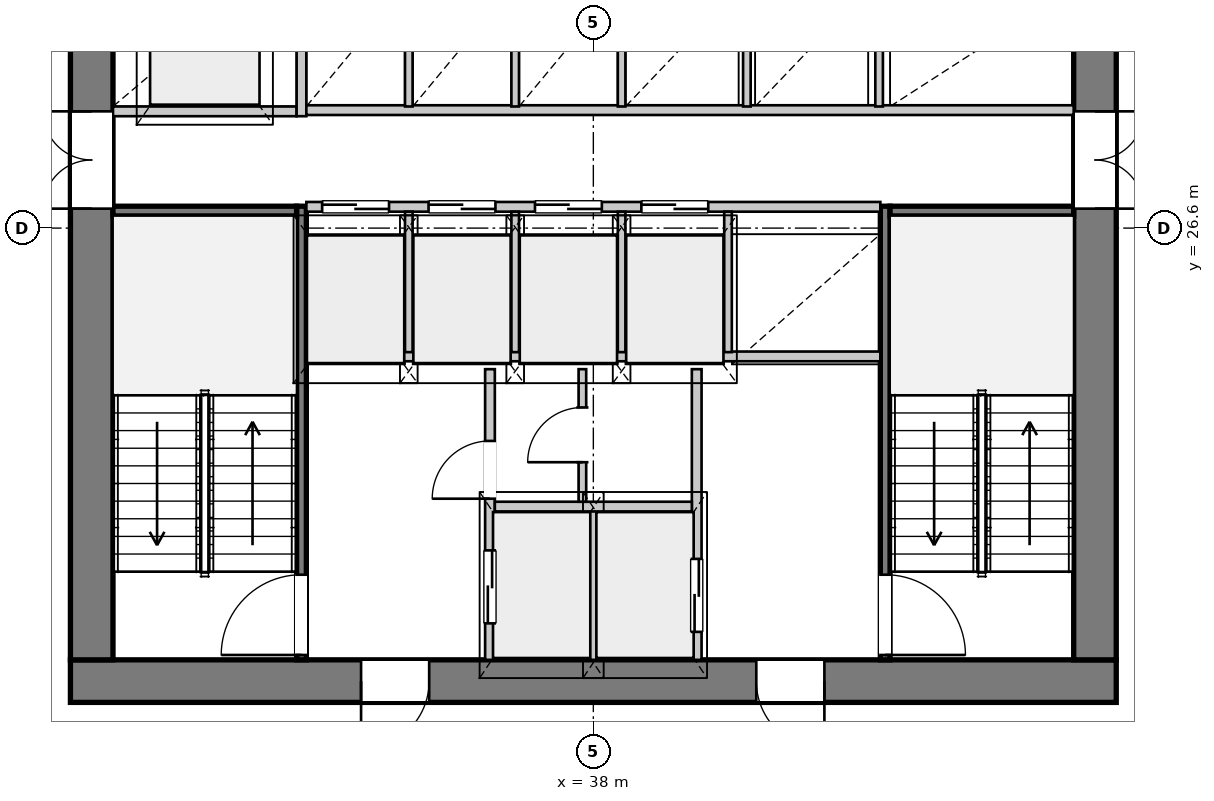
"""IFC4 building model, lengths in metres.
Left out: names, types, materials, properties, quantities, classifications, styles, units other than length and angle.
Written with IfcOpenShell. Run it as: python <this file> out.ifc"""

import sys

from ifc_helpers import new_model, si_unit, direction, frame, frame_2d, origin, place, context, subcontext, project, spatial, rectangle, extrude, source, transform, mapped, element, fill, save


model = new_model("IFC4")
c1 = context("Model", 3, precision=1e-05, world=origin(), true_north=direction((0.0, 1.0)))
c2 = subcontext(c1, "Body", "Model", "MODEL_VIEW")
j1 = project(units=[si_unit("LENGTHUNIT", "METRE"), si_unit("PLANEANGLEUNIT", "RADIAN")], contexts=[c1])
p1 = place(None, origin())
s1 = spatial("IfcSite", under=j1, at=p1, CompositionType="ELEMENT")
p2 = place(p1, origin())
s2 = spatial("IfcBuilding", under=s1, at=p2, CompositionType="ELEMENT")
p3 = place(p2, frame((0.0, 0.0, 98.6)))
s3 = spatial("IfcBuildingStorey", under=s2, at=p3, CompositionType="ELEMENT", Elevation=98.6)
p4 = place(p3, frame((46.6, 19.15, 0.0), z_axis=(0.0, 0.0, 1.0), x_axis=(-1.0, 0.0, 0.0)))
e1 = element("IfcWall", 1, at=p4, inside=s3, PredefinedType="SHEAR", context=c2, shape_type="SweptSolid", body=[
    extrude(rectangle(XDim=17.2, YDim=0.7, at=frame_2d((8.6, 0.0))), origin(), (0.0, 0.0, 1.0), 3.3),
])
p5 = place(p4, frame((4.8, 0.0, 0.0)))
e2 = element("IfcOpeningElement", 2, at=p5, cuts=e1, PredefinedType="OPENING", context=c2, shape_type="SweptSolid", body=[
    extrude(rectangle(XDim=1.12, YDim=2.25, at=frame_2d((0.56, 1.125))), frame((0.0, 0.36, 0.0), z_axis=(0.0, -1.0, 0.0), x_axis=(1.0, 0.0, 0.0)), (0.0, 0.0, 1.0), 0.72),
])
p6 = place(p4, frame((11.3, 0.0, 0.0)))
e3 = element("IfcOpeningElement", 3, at=p6, cuts=e1, PredefinedType="OPENING", context=c2, shape_type="SweptSolid", body=[
    extrude(rectangle(XDim=1.12, YDim=2.25, at=frame_2d((0.56, 1.125))), frame((0.0, 0.36, 0.0), z_axis=(0.0, -1.0, 0.0), x_axis=(1.0, 0.0, 0.0)), (0.0, 0.0, 1.0), 0.72),
])
p7 = place(p3, frame((29.75, 19.5, 0.0), z_axis=(0.0, 0.0, 1.0), x_axis=(0.0, 1.0, 0.0)))
e4 = element("IfcWall", 4, at=p7, inside=s3, PredefinedType="SHEAR", context=c2, shape_type="SweptSolid", body=[
    extrude(rectangle(XDim=14.2, YDim=0.7, at=frame_2d((7.1, 0.0))), origin(), (0.0, 0.0, 1.0), 3.3),
])
p8 = place(p7, frame((7.42, 0.0, 0.0)))
e5 = element("IfcOpeningElement", 5, at=p8, cuts=e4, PredefinedType="OPENING", context=c2, shape_type="SweptSolid", body=[
    extrude(rectangle(XDim=1.6, YDim=2.2, at=frame_2d((0.8, 1.1))), frame((0.0, 0.36, 0.0), z_axis=(0.0, -1.0, 0.0), x_axis=(1.0, 0.0, 0.0)), (0.0, 0.0, 1.0), 0.72),
])
p9 = place(p3, frame((46.25, 33.7, 0.0), z_axis=(0.0, 0.0, 1.0), x_axis=(0.0, -1.0, 0.0)))
e6 = element("IfcWall", 6, at=p9, inside=s3, PredefinedType="SHEAR", context=c2, shape_type="SweptSolid", body=[
    extrude(rectangle(XDim=14.2, YDim=0.7, at=frame_2d((7.1, 0.0))), origin(), (0.0, 0.0, 1.0), 3.3),
])
p10 = place(p9, frame((5.18, 0.0, 0.0)))
e7 = element("IfcOpeningElement", 7, at=p10, cuts=e6, PredefinedType="OPENING", context=c2, shape_type="SweptSolid", body=[
    extrude(rectangle(XDim=1.6, YDim=2.2, at=frame_2d((0.8, 1.1))), frame((0.0, 0.36, 0.0), z_axis=(0.0, -1.0, 0.0), x_axis=(1.0, 0.0, 0.0)), (0.0, 0.0, 1.0), 0.72),
])
p11 = place(p3, frame((33.2, 19.5, 0.0), z_axis=(0.0, 0.0, 1.0), x_axis=(0.0, 1.0, 0.0)))
e8 = element("IfcWall", 8, at=p11, inside=s3, PredefinedType="PARTITIONING", context=c2, shape_type="SweptSolid", body=[
    extrude(rectangle(XDim=7.46, YDim=0.16, at=frame_2d((3.73, 0.0))), origin(), (0.0, 0.0, 1.0), 3.3),
])
p12 = place(p11, frame((0.08, 0.0, 0.0)))
e9 = element("IfcOpeningElement", 9, at=p12, cuts=e8, PredefinedType="OPENING", context=c2, shape_type="SweptSolid", body=[
    extrude(rectangle(XDim=1.32, YDim=2.2, at=frame_2d((0.66, 1.1))), frame((0.0, 0.09, 0.0), z_axis=(0.0, -1.0, 0.0), x_axis=(1.0, 0.0, 0.0)), (0.0, 0.0, 1.0), 0.18),
])
p13 = place(p3, frame((30.1, 26.88, 0.0), z_axis=(0.0, 0.0, 1.0), x_axis=(1.0, 0.0, 0.0)))
e10 = element("IfcWall", 10, at=p13, inside=s3, PredefinedType="PARTITIONING", context=c2, shape_type="SweptSolid", body=[
    extrude(rectangle(XDim=3.02, YDim=0.16, at=frame_2d((1.51, 0.0))), origin(), (0.0, 0.0, 1.0), 3.3),
])
p14 = place(p3, frame((42.8, 26.96, 0.0), z_axis=(0.0, 0.0, 1.0), x_axis=(0.0, -1.0, 0.0)))
e11 = element("IfcWall", 11, at=p14, inside=s3, PredefinedType="PARTITIONING", context=c2, shape_type="SweptSolid", body=[
    extrude(rectangle(XDim=7.46, YDim=0.16, at=frame_2d((3.73, 0.0))), origin(), (0.0, 0.0, 1.0), 3.3),
])
p15 = place(p14, frame((6.06, 0.0, 0.0)))
e12 = element("IfcOpeningElement", 12, at=p15, cuts=e11, PredefinedType="OPENING", context=c2, shape_type="SweptSolid", body=[
    extrude(rectangle(XDim=1.32, YDim=2.2, at=frame_2d((0.66, 1.1))), frame((0.0, 0.09, 0.0), z_axis=(0.0, -1.0, 0.0), x_axis=(1.0, 0.0, 0.0)), (0.0, 0.0, 1.0), 0.18),
])
p16 = place(p3, frame((42.88, 26.88, 0.0), z_axis=(0.0, 0.0, 1.0), x_axis=(1.0, 0.0, 0.0)))
e13 = element("IfcWall", 13, at=p16, inside=s3, PredefinedType="PARTITIONING", context=c2, shape_type="SweptSolid", body=[
    extrude(rectangle(XDim=3.02, YDim=0.16, at=frame_2d((1.51, 0.0))), origin(), (0.0, 0.0, 1.0), 3.3),
])
p17 = place(p3, frame((36.3, 19.5, 0.0), z_axis=(0.0, 0.0, 1.0), x_axis=(0.0, 1.0, 0.0)))
e14 = element("IfcWall", 14, at=p17, inside=s3, PredefinedType="PARTITIONING", context=c2, shape_type="SweptSolid", body=[
    extrude(rectangle(XDim=4.78, YDim=0.16, at=frame_2d((2.39, 0.0))), origin(), (0.0, 0.0, 1.0), 3.3),
])
p18 = place(p17, frame((0.6, 0.0, 0.0)))
e15 = element("IfcOpeningElement", 15, at=p18, cuts=e14, PredefinedType="OPENING", context=c2, shape_type="SweptSolid", body=[
    extrude(rectangle(XDim=1.2, YDim=2.2, at=frame_2d((0.6, 1.1))), frame((0.0, 0.09, 0.0), z_axis=(0.0, -1.0, 0.0), x_axis=(1.0, 0.0, 0.0)), (0.0, 0.0, 1.0), 0.18),
])
p19 = place(p17, frame((2.65, 0.0, 0.0)))
e16 = element("IfcOpeningElement", 16, at=p19, cuts=e14, PredefinedType="OPENING", context=c2, shape_type="SweptSolid", body=[
    extrude(rectangle(XDim=0.95, YDim=2.1, at=frame_2d((0.475, 1.05))), frame((0.0, 0.09, 0.0), z_axis=(0.0, -1.0, 0.0), x_axis=(1.0, 0.0, 0.0)), (0.0, 0.0, 1.0), 0.18),
])
p20 = place(p3, frame((39.7, 24.28, 0.0), z_axis=(0.0, 0.0, 1.0), x_axis=(0.0, -1.0, 0.0)))
e17 = element("IfcWall", 17, at=p20, inside=s3, PredefinedType="PARTITIONING", context=c2, shape_type="SweptSolid", body=[
    extrude(rectangle(XDim=4.78, YDim=0.16, at=frame_2d((2.39, 0.0))), origin(), (0.0, 0.0, 1.0), 3.3),
])
p21 = place(p20, frame((3.12, 0.0, 0.0)))
e18 = element("IfcOpeningElement", 18, at=p21, cuts=e17, PredefinedType="OPENING", context=c2, shape_type="SweptSolid", body=[
    extrude(rectangle(XDim=1.2, YDim=2.2, at=frame_2d((0.6, 1.1))), frame((0.0, 0.09, 0.0), z_axis=(0.0, -1.0, 0.0), x_axis=(1.0, 0.0, 0.0)), (0.0, 0.0, 1.0), 0.18),
])
p22 = place(p3, frame((38.0, 19.5, 0.0), z_axis=(0.0, 0.0, 1.0), x_axis=(0.0, 1.0, 0.0)))
e19 = element("IfcWall", 19, at=p22, inside=s3, PredefinedType="PARTITIONING", context=c2, shape_type="SweptSolid", body=[
    extrude(rectangle(XDim=2.46, YDim=0.125, at=frame_2d((1.23, 0.0))), origin(), (0.0, 0.0, 1.0), 3.3),
])
p23 = place(p3, frame((36.38, 22.02, 0.0), z_axis=(0.0, 0.0, 1.0), x_axis=(1.0, 0.0, 0.0)))
e20 = element("IfcWall", 20, at=p23, inside=s3, PredefinedType="PARTITIONING", context=c2, shape_type="SweptSolid", body=[
    extrude(rectangle(XDim=3.24, YDim=0.16, at=frame_2d((1.62, 0.0))), origin(), (0.0, 0.0, 1.0), 3.3),
])
p24 = place(p3, frame((33.28, 24.49, 0.0), z_axis=(0.0, 0.0, 1.0), x_axis=(1.0, 0.0, 0.0)))
e21 = element("IfcWall", 21, at=p24, inside=s3, PredefinedType="PARTITIONING", context=c2, shape_type="SweptSolid", body=[
    extrude(rectangle(XDim=9.44, YDim=0.16, at=frame_2d((4.72, 0.0))), origin(), (0.0, 0.0, 1.0), 3.3),
])
p25 = place(p3, frame((37.82, 22.1, 0.0), z_axis=(0.0, 0.0, 1.0), x_axis=(0.0, 1.0, 0.0)))
e22 = element("IfcWall", 22, at=p25, inside=s3, PredefinedType="PARTITIONING", context=c2, shape_type="SweptSolid", body=[
    extrude(rectangle(XDim=2.18, YDim=0.125, at=frame_2d((1.09, 0.0))), origin(), (0.0, 0.0, 1.0), 3.3),
])
p26 = place(p25, frame((0.65, 0.0, 0.0)))
e23 = element("IfcOpeningElement", 23, at=p26, cuts=e22, PredefinedType="OPENING", context=c2, shape_type="SweptSolid", body=[
    extrude(rectangle(XDim=0.9, YDim=2.1, at=frame_2d((0.45, 1.05))), frame((0.0, 0.073, 0.0), z_axis=(0.0, -1.0, 0.0), x_axis=(1.0, 0.0, 0.0)), (0.0, 0.0, 1.0), 0.145),
])
p27 = place(p3, frame((30.1, 28.52, 0.0), z_axis=(0.0, 0.0, 1.0), x_axis=(1.0, 0.0, 0.0)))
e24 = element("IfcWall", 24, at=p27, inside=s3, PredefinedType="PARTITIONING", context=c2, shape_type="SweptSolid", body=[
    extrude(rectangle(XDim=3.02, YDim=0.16, at=frame_2d((1.51, 0.0))), origin(), (0.0, 0.0, 1.0), 3.3),
])
p28 = place(p3, frame((33.2, 28.44, 0.0), z_axis=(0.0, 0.0, 1.0), x_axis=(0.0, 1.0, 0.0)))
e25 = element("IfcWall", 25, at=p28, inside=s3, PredefinedType="PARTITIONING", context=c2, shape_type="SweptSolid", body=[
    extrude(rectangle(XDim=5.26, YDim=0.16, at=frame_2d((2.63, 0.0))), origin(), (0.0, 0.0, 1.0), 3.3),
])
p29 = place(p3, frame((33.28, 26.95, 0.0), z_axis=(0.0, 0.0, 1.0), x_axis=(1.0, 0.0, 0.0)))
e26 = element("IfcWall", 26, at=p29, inside=s3, PredefinedType="PARTITIONING", context=c2, shape_type="SweptSolid", body=[
    extrude(rectangle(XDim=9.44, YDim=0.16, at=frame_2d((4.72, 0.0))), origin(), (0.0, 0.0, 1.0), 3.3),
])
p30 = place(p29, frame((0.26, 0.0, 0.0)))
e27 = element("IfcOpeningElement", 27, at=p30, cuts=e26, PredefinedType="OPENING", context=c2, shape_type="SweptSolid", body=[
    extrude(rectangle(XDim=1.1, YDim=2.2, at=frame_2d((0.55, 1.1))), frame((0.0, 0.09, 0.0), z_axis=(0.0, -1.0, 0.0), x_axis=(1.0, 0.0, 0.0)), (0.0, 0.0, 1.0), 0.18),
])
p31 = place(p29, frame((2.01, 0.0, 0.0)))
e28 = element("IfcOpeningElement", 28, at=p31, cuts=e26, PredefinedType="OPENING", context=c2, shape_type="SweptSolid", body=[
    extrude(rectangle(XDim=1.1, YDim=2.2, at=frame_2d((0.55, 1.1))), frame((0.0, 0.09, 0.0), z_axis=(0.0, -1.0, 0.0), x_axis=(1.0, 0.0, 0.0)), (0.0, 0.0, 1.0), 0.18),
])
p32 = place(p29, frame((3.76, 0.0, 0.0)))
e29 = element("IfcOpeningElement", 29, at=p32, cuts=e26, PredefinedType="OPENING", context=c2, shape_type="SweptSolid", body=[
    extrude(rectangle(XDim=1.1, YDim=2.2, at=frame_2d((0.55, 1.1))), frame((0.0, 0.09, 0.0), z_axis=(0.0, -1.0, 0.0), x_axis=(1.0, 0.0, 0.0)), (0.0, 0.0, 1.0), 0.18),
])
p33 = place(p29, frame((5.51, 0.0, 0.0)))
e30 = element("IfcOpeningElement", 30, at=p33, cuts=e26, PredefinedType="OPENING", context=c2, shape_type="SweptSolid", body=[
    extrude(rectangle(XDim=1.1, YDim=2.2, at=frame_2d((0.55, 1.1))), frame((0.0, 0.09, 0.0), z_axis=(0.0, -1.0, 0.0), x_axis=(1.0, 0.0, 0.0)), (0.0, 0.0, 1.0), 0.18),
])
for number, where, z_axis, x_axis in (
    (31, (34.965, 24.56, 0.0), (0.0, 0.0, 1.0), (0.0, 1.0, 0.0)),
    (32, (36.715, 24.56, 0.0), (0.0, 0.0, 1.0), (0.0, 1.0, 0.0)),
    (33, (38.465, 24.56, 0.0), (0.0, 0.0, 1.0), (0.0, 1.0, 0.0)),
    (34, (40.215, 24.56, 0.0), (0.0, 0.0, 1.0), (0.0, 1.0, 0.0)),
):
    element("IfcWall", number, at=place(p3, frame(where, z_axis=z_axis, x_axis=x_axis)), inside=s3, PredefinedType="PARTITIONING", context=c2, shape_type="SweptSolid", body=[
        extrude(rectangle(XDim=2.31, YDim=0.125, at=frame_2d((1.155, 0.0))), origin(), (0.0, 0.0, 1.0), 3.3),
    ])
p34 = place(p3, frame((33.28, 28.54, 0.0), z_axis=(0.0, 0.0, 1.0), x_axis=(1.0, 0.0, 0.0)))
e35 = element("IfcWall", 35, at=p34, inside=s3, PredefinedType="PARTITIONING", context=c2, shape_type="SweptSolid", body=[
    extrude(rectangle(XDim=12.62, YDim=0.16, at=frame_2d((6.31, 0.0))), origin(), (0.0, 0.0, 1.0), 3.3),
])
for number, where, z_axis, x_axis in (
    (36, (34.965, 28.6, 0.0), (0.0, 0.0, 1.0), (0.0, 1.0, 0.0)),
    (37, (36.715, 28.6, 0.0), (0.0, 0.0, 1.0), (0.0, 1.0, 0.0)),
    (38, (38.465, 28.6, 0.0), (0.0, 0.0, 1.0), (0.0, 1.0, 0.0)),
    (39, (40.525, 28.6, 0.0), (0.0, 0.0, 1.0), (0.0, 1.0, 0.0)),
    (40, (42.7, 28.6, 0.0), (0.0, 0.0, 1.0), (0.0, 1.0, 0.0)),
):
    element("IfcWall", number, at=place(p3, frame(where, z_axis=z_axis, x_axis=x_axis)), inside=s3, PredefinedType="PARTITIONING", context=c2, shape_type="SweptSolid", body=[
        extrude(rectangle(XDim=1.92, YDim=0.125, at=frame_2d((0.96, 0.0))), origin(), (0.0, 0.0, 1.0), 3.3),
    ])
m1 = source(origin(), c2, "Body", "SweptSolid", [
    extrude(rectangle(XDim=1.12, YDim=2.25, at=frame_2d((0.56, 1.125))), frame((0.0, 0.025, 0.0), z_axis=(0.0, -1.0, 0.0), x_axis=(1.0, 0.0, 0.0)), (0.0, 0.0, 1.0), 0.05),
])
p35 = place(p5, origin())
e41 = element("IfcDoor", 41, at=p35, inside=s3, OperationType="SINGLE_SWING_LEFT", PredefinedType="DOOR", context=c2, shape_type="MappedRepresentation", body=[
    mapped(m1, transform((0.0, 0.0, 0.0), x_axis=(1.0, 0.0, 0.0), y_axis=(0.0, 1.0, 0.0), z_axis=(0.0, 0.0, 1.0), scale=1.0)),
])
fill(e2, e41)
p36 = place(p6, origin())
e42 = element("IfcDoor", 42, at=p36, inside=s3, OperationType="SINGLE_SWING_RIGHT", PredefinedType="DOOR", context=c2, shape_type="MappedRepresentation", body=[
    mapped(m1, transform((0.0, 0.0, 0.0), x_axis=(1.0, 0.0, 0.0), y_axis=(0.0, 1.0, 0.0), z_axis=(0.0, 0.0, 1.0), scale=1.0)),
])
fill(e3, e42)
m2 = source(origin(), c2, "Body", "SweptSolid", [
    extrude(rectangle(XDim=1.6, YDim=2.2, at=frame_2d((0.8, 1.1))), frame((0.0, 0.025, 0.0), z_axis=(0.0, -1.0, 0.0), x_axis=(1.0, 0.0, 0.0)), (0.0, 0.0, 1.0), 0.05),
])
p37 = place(p8, origin())
e43 = element("IfcDoor", 43, at=p37, inside=s3, OperationType="DOUBLE_DOOR_SINGLE_SWING", PredefinedType="DOOR", context=c2, shape_type="MappedRepresentation", body=[
    mapped(m2, transform((0.0, 0.0, 0.0), x_axis=(1.0, 0.0, 0.0), y_axis=(0.0, 1.0, 0.0), z_axis=(0.0, 0.0, 1.0), scale=1.0)),
])
fill(e5, e43)
p38 = place(p10, origin())
e44 = element("IfcDoor", 44, at=p38, inside=s3, OperationType="DOUBLE_DOOR_SINGLE_SWING", PredefinedType="DOOR", context=c2, shape_type="MappedRepresentation", body=[
    mapped(m2, transform((0.0, 0.0, 0.0), x_axis=(1.0, 0.0, 0.0), y_axis=(0.0, 1.0, 0.0), z_axis=(0.0, 0.0, 1.0), scale=1.0)),
])
fill(e7, e44)
m3 = source(origin(), c2, "Body", "SweptSolid", [
    extrude(rectangle(XDim=1.32, YDim=2.2, at=frame_2d((0.66, 1.1))), frame((0.0, 0.025, 0.0), z_axis=(0.0, -1.0, 0.0), x_axis=(1.0, 0.0, 0.0)), (0.0, 0.0, 1.0), 0.05),
])
p39 = place(p12, origin())
e45 = element("IfcDoor", 45, at=p39, inside=s3, OperationType="SINGLE_SWING_LEFT", PredefinedType="DOOR", context=c2, shape_type="MappedRepresentation", body=[
    mapped(m3, transform((0.0, 0.0, 0.0), x_axis=(1.0, 0.0, 0.0), y_axis=(0.0, 1.0, 0.0), z_axis=(0.0, 0.0, 1.0), scale=1.0)),
])
fill(e9, e45)
p40 = place(p15, origin())
e46 = element("IfcDoor", 46, at=p40, inside=s3, OperationType="SINGLE_SWING_RIGHT", PredefinedType="DOOR", context=c2, shape_type="MappedRepresentation", body=[
    mapped(m3, transform((0.0, 0.0, 0.0), x_axis=(1.0, 0.0, 0.0), y_axis=(0.0, 1.0, 0.0), z_axis=(0.0, 0.0, 1.0), scale=1.0)),
])
fill(e12, e46)
m4 = source(origin(), c2, "Body", "SweptSolid", [
    extrude(rectangle(XDim=1.2, YDim=2.2, at=frame_2d((0.6, 1.1))), frame((0.0, 0.025, 0.0), z_axis=(0.0, -1.0, 0.0), x_axis=(1.0, 0.0, 0.0)), (0.0, 0.0, 1.0), 0.05),
])
p41 = place(p18, origin())
e47 = element("IfcDoor", 47, at=p41, inside=s3, OperationType="DOUBLE_DOOR_SLIDING", PredefinedType="DOOR", context=c2, shape_type="MappedRepresentation", body=[
    mapped(m4, transform((0.0, 0.0, 0.0), x_axis=(1.0, 0.0, 0.0), y_axis=(0.0, 1.0, 0.0), z_axis=(0.0, 0.0, 1.0), scale=1.0)),
])
fill(e15, e47)
m5 = source(origin(), c2, "Body", "SweptSolid", [
    extrude(rectangle(XDim=0.95, YDim=2.1, at=frame_2d((0.475, 1.05))), frame((0.0, 0.025, 0.0), z_axis=(0.0, -1.0, 0.0), x_axis=(1.0, 0.0, 0.0)), (0.0, 0.0, 1.0), 0.05),
])
p42 = place(p19, origin())
e48 = element("IfcDoor", 48, at=p42, inside=s3, OperationType="SINGLE_SWING_LEFT", PredefinedType="DOOR", context=c2, shape_type="MappedRepresentation", body=[
    mapped(m5, transform((0.0, 0.0, 0.0), x_axis=(1.0, 0.0, 0.0), y_axis=(0.0, 1.0, 0.0), z_axis=(0.0, 0.0, 1.0), scale=1.0)),
])
fill(e16, e48)
m6 = source(origin(), c2, "Body", "SweptSolid", [
    extrude(rectangle(XDim=0.9, YDim=2.1, at=frame_2d((0.45, 1.05))), frame((0.0, 0.025, 0.0), z_axis=(0.0, -1.0, 0.0), x_axis=(1.0, 0.0, 0.0)), (0.0, 0.0, 1.0), 0.05),
])
p43 = place(p26, origin())
e49 = element("IfcDoor", 49, at=p43, inside=s3, OperationType="SINGLE_SWING_LEFT", PredefinedType="DOOR", context=c2, shape_type="MappedRepresentation", body=[
    mapped(m6, transform((0.0, 0.0, 0.0), x_axis=(1.0, 0.0, 0.0), y_axis=(0.0, 1.0, 0.0), z_axis=(0.0, 0.0, 1.0), scale=1.0)),
])
fill(e23, e49)
p44 = place(p21, origin())
e50 = element("IfcDoor", 50, at=p44, inside=s3, OperationType="DOUBLE_DOOR_SLIDING", PredefinedType="DOOR", context=c2, shape_type="MappedRepresentation", body=[
    mapped(m4, transform((0.0, 0.0, 0.0), x_axis=(1.0, 0.0, 0.0), y_axis=(0.0, 1.0, 0.0), z_axis=(0.0, 0.0, 1.0), scale=1.0)),
])
fill(e18, e50)
m7 = source(origin(), c2, "Body", "SweptSolid", [
    extrude(rectangle(XDim=1.1, YDim=2.2, at=frame_2d((0.55, 1.1))), frame((0.0, 0.025, 0.0), z_axis=(0.0, -1.0, 0.0), x_axis=(1.0, 0.0, 0.0)), (0.0, 0.0, 1.0), 0.05),
])
p45 = place(p30, origin())
e51 = element("IfcDoor", 51, at=p45, inside=s3, OperationType="DOUBLE_DOOR_SLIDING", PredefinedType="DOOR", context=c2, shape_type="MappedRepresentation", body=[
    mapped(m7, transform((0.0, 0.0, 0.0), x_axis=(1.0, 0.0, 0.0), y_axis=(0.0, 1.0, 0.0), z_axis=(0.0, 0.0, 1.0), scale=1.0)),
])
fill(e27, e51)
p46 = place(p31, origin())
e52 = element("IfcDoor", 52, at=p46, inside=s3, OperationType="DOUBLE_DOOR_SLIDING", PredefinedType="DOOR", context=c2, shape_type="MappedRepresentation", body=[
    mapped(m7, transform((0.0, 0.0, 0.0), x_axis=(1.0, 0.0, 0.0), y_axis=(0.0, 1.0, 0.0), z_axis=(0.0, 0.0, 1.0), scale=1.0)),
])
fill(e28, e52)
p47 = place(p32, origin())
e53 = element("IfcDoor", 53, at=p47, inside=s3, OperationType="DOUBLE_DOOR_SLIDING", PredefinedType="DOOR", context=c2, shape_type="MappedRepresentation", body=[
    mapped(m7, transform((0.0, 0.0, 0.0), x_axis=(1.0, 0.0, 0.0), y_axis=(0.0, 1.0, 0.0), z_axis=(0.0, 0.0, 1.0), scale=1.0)),
])
fill(e29, e53)
p48 = place(p33, origin())
e54 = element("IfcDoor", 54, at=p48, inside=s3, OperationType="DOUBLE_DOOR_SLIDING", PredefinedType="DOOR", context=c2, shape_type="MappedRepresentation", body=[
    mapped(m7, transform((0.0, 0.0, 0.0), x_axis=(1.0, 0.0, 0.0), y_axis=(0.0, 1.0, 0.0), z_axis=(0.0, 0.0, 1.0), scale=1.0)),
])
fill(e30, e54)
save(model, sys.argv[1])
